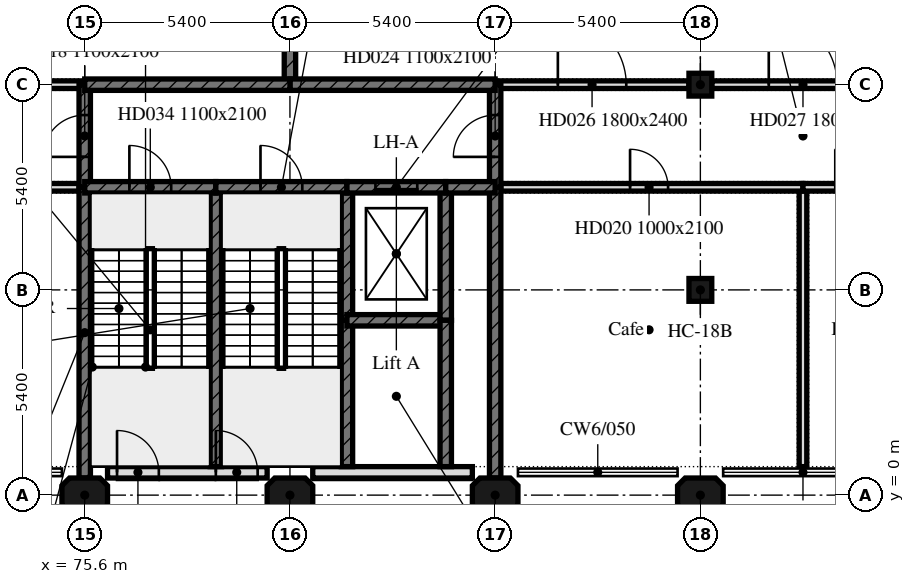
"""IFC4 building model, lengths in metres.
Left out: names, types, materials, properties, quantities, classifications, styles, units other than length and angle.
Written with IfcOpenShell. Run it as: python <this file> out.ifc"""

import sys

from ifc_helpers import new_model, si_unit, direction, frame, frame_2d, origin, origin_2d, place, context, subcontext, project, spatial, polyline, rectangle, outline, extrude, element, fill, save


model = new_model("IFC4")
c1 = context("Model", 3, precision=1e-05, world=origin(), true_north=direction((0.0, 1.0)))
c2 = subcontext(c1, "Body", "Model", "MODEL_VIEW")
j1 = project(units=[si_unit("LENGTHUNIT", "METRE"), si_unit("PLANEANGLEUNIT", "RADIAN")], contexts=[c1])
p1 = place(None, origin())
s1 = spatial("IfcSite", under=j1, at=p1, CompositionType="ELEMENT")
p2 = place(p1, origin())
s2 = spatial("IfcBuilding", under=s1, at=p2, CompositionType="ELEMENT")
p3 = place(p2, origin())
s3 = spatial("IfcBuildingStorey", under=s2, at=p3, CompositionType="ELEMENT", Elevation=0.0)
for number, where, z_axis, x_axis in (
    (1, (75.6, 0.0, -0.4), (0.0, 0.0, 1.0), (1.0, 0.0, 0.0)),
    (2, (81.0, 0.0, -0.4), (0.0, 0.0, 1.0), (1.0, 0.0, 0.0)),
    (3, (86.4, 0.0, -0.4), (0.0, 0.0, 1.0), (1.0, 0.0, 0.0)),
    (4, (91.8, 0.0, -0.4), (0.0, 0.0, 1.0), (1.0, 0.0, 0.0)),
):
    element("IfcColumn", number, at=place(p3, frame(where, z_axis=z_axis, x_axis=x_axis)), inside=s3, PredefinedType="COLUMN", context=c2, shape_type="SweptSolid", body=[
        extrude(outline(polyline([(-0.4, -0.45), (0.4, -0.45), (0.6, -0.25), (0.6, 0.25), (0.4, 0.45), (-0.4, 0.45), (-0.6, 0.25), (-0.6, -0.25), (-0.4, -0.45)])), origin(), (0.0, 0.0, 1.0), 8.5),
    ])
for number, where, z_axis, x_axis in (
    (5, (91.8, 5.4, -0.4), (0.0, 0.0, 1.0), (1.0, 0.0, 0.0)),
    (6, (91.8, 10.8, -0.4), (0.0, 0.0, 1.0), (1.0, 0.0, 0.0)),
):
    element("IfcColumn", number, at=place(p3, frame(where, z_axis=z_axis, x_axis=x_axis)), inside=s3, PredefinedType="COLUMN", context=c2, shape_type="SweptSolid", body=[
        extrude(rectangle(XDim=0.6, YDim=0.6, at=origin_2d()), origin(), (0.0, 0.0, 1.0), 8.5),
    ])
p4 = place(p3, frame((76.2, 0.6, 0.0), z_axis=(0.0, 0.0, 1.0), x_axis=(1.0, 0.0, 0.0)))
e7 = element("IfcWall", 7, at=p4, inside=s3, PredefinedType="SOLIDWALL", context=c2, shape_type="SweptSolid", body=[
    extrude(rectangle(XDim=4.2, YDim=0.3, at=frame_2d((2.1, 0.0))), origin(), (0.0, 0.0, 1.0), 8.1),
])
p5 = place(p4, frame((0.25, 0.0, 0.0)))
e8 = element("IfcOpeningElement", 8, at=p5, cuts=e7, PredefinedType="OPENING", context=c2, shape_type="SweptSolid", body=[
    extrude(rectangle(XDim=1.1, YDim=2.1, at=frame_2d((0.55, 1.05))), frame((0.0, 0.15, 0.0), z_axis=(0.0, -1.0, 0.0), x_axis=(1.0, 0.0, 0.0)), (0.0, 0.0, 1.0), 0.3),
])
p6 = place(p4, frame((2.85, 0.0, 0.0)))
e9 = element("IfcOpeningElement", 9, at=p6, cuts=e7, PredefinedType="OPENING", context=c2, shape_type="SweptSolid", body=[
    extrude(rectangle(XDim=1.1, YDim=2.1, at=frame_2d((0.55, 1.05))), frame((0.0, 0.15, 0.0), z_axis=(0.0, -1.0, 0.0), x_axis=(1.0, 0.0, 0.0)), (0.0, 0.0, 1.0), 0.3),
])
p7 = place(p3, frame((81.6, 0.6, 0.0), z_axis=(0.0, 0.0, 1.0), x_axis=(1.0, 0.0, 0.0)))
e10 = element("IfcWall", 10, at=p7, inside=s3, PredefinedType="SOLIDWALL", context=c2, shape_type="SweptSolid", body=[
    extrude(rectangle(XDim=4.2, YDim=0.3, at=frame_2d((2.1, 0.0))), origin(), (0.0, 0.0, 1.0), 8.1),
])
p8 = place(p3, frame((65.55, 8.1, 0.0), z_axis=(0.0, 0.0, 1.0), x_axis=(1.0, 0.0, 0.0)))
e11 = element("IfcWall", 11, at=p8, inside=s3, PredefinedType="PARTITIONING", context=c2, shape_type="SweptSolid", body=[
    extrude(rectangle(XDim=10.05, YDim=0.2, at=frame_2d((5.025, 0.0))), origin(), (0.0, 0.0, 1.0), 8.1),
])
p9 = place(p8, frame((4.525, 0.0, 0.0)))
e12 = element("IfcOpeningElement", 12, at=p9, cuts=e11, PredefinedType="OPENING", context=c2, shape_type="SweptSolid", body=[
    extrude(rectangle(XDim=1.0, YDim=2.1, at=frame_2d((0.5, 1.05))), frame((0.0, 0.1, 0.0), z_axis=(0.0, -1.0, 0.0), x_axis=(1.0, 0.0, 0.0)), (0.0, 0.0, 1.0), 0.2),
])
p10 = place(p3, frame((75.6, 0.45, 0.0), z_axis=(0.0, 0.0, 1.0), x_axis=(0.0, 1.0, 0.0)))
e13 = element("IfcWall", 13, at=p10, inside=s3, PredefinedType="SHEAR", context=c2, shape_type="SweptSolid", body=[
    extrude(rectangle(XDim=7.65, YDim=0.3, at=frame_2d((3.825, 0.0))), origin(), (0.0, 0.0, 1.0), 8.1),
])
p11 = place(p3, frame((70.5, 10.8, 0.0), z_axis=(0.0, 0.0, 1.0), x_axis=(1.0, 0.0, 0.0)))
e14 = element("IfcWall", 14, at=p11, inside=s3, PredefinedType="PARTITIONING", context=c2, shape_type="SweptSolid", body=[
    extrude(rectangle(XDim=5.1, YDim=0.2, at=frame_2d((2.55, 0.0))), origin(), (0.0, 0.0, 1.0), 8.1),
])
p12 = place(p3, frame((75.6, 8.1, 0.0), z_axis=(0.0, 0.0, 1.0), x_axis=(0.0, 1.0, 0.0)))
e15 = element("IfcWall", 15, at=p12, inside=s3, PredefinedType="SHEAR", context=c2, shape_type="SweptSolid", body=[
    extrude(rectangle(XDim=2.7, YDim=0.3, at=frame_2d((1.35, 0.0))), origin(), (0.0, 0.0, 1.0), 8.1),
])
p13 = place(p12, frame((0.8, 0.0, 0.0)))
e16 = element("IfcOpeningElement", 16, at=p13, cuts=e15, PredefinedType="OPENING", context=c2, shape_type="SweptSolid", body=[
    extrude(rectangle(XDim=1.1, YDim=2.1, at=frame_2d((0.55, 1.05))), frame((0.0, 0.15, 0.0), z_axis=(0.0, -1.0, 0.0), x_axis=(1.0, 0.0, 0.0)), (0.0, 0.0, 1.0), 0.3),
])
p14 = place(p3, frame((94.5, 0.75, 0.0), z_axis=(0.0, 0.0, 1.0), x_axis=(0.0, 1.0, 0.0)))
e17 = element("IfcWall", 17, at=p14, inside=s3, PredefinedType="PARTITIONING", context=c2, shape_type="SweptSolid", body=[
    extrude(rectangle(XDim=7.35, YDim=0.2, at=frame_2d((3.675, 0.0))), origin(), (0.0, 0.0, 1.0), 8.1),
])
p15 = place(p3, frame((86.4, 8.1, 0.0), z_axis=(0.0, 0.0, 1.0), x_axis=(1.0, 0.0, 0.0)))
e18 = element("IfcWall", 18, at=p15, inside=s3, PredefinedType="PARTITIONING", context=c2, shape_type="SweptSolid", body=[
    extrude(rectangle(XDim=8.1, YDim=0.2, at=frame_2d((4.05, 0.0))), origin(), (0.0, 0.0, 1.0), 8.1),
])
p16 = place(p15, frame((3.55, 0.0, 0.0)))
e19 = element("IfcOpeningElement", 19, at=p16, cuts=e18, PredefinedType="OPENING", context=c2, shape_type="SweptSolid", body=[
    extrude(rectangle(XDim=1.0, YDim=2.1, at=frame_2d((0.5, 1.05))), frame((0.0, 0.1, 0.0), z_axis=(0.0, -1.0, 0.0), x_axis=(1.0, 0.0, 0.0)), (0.0, 0.0, 1.0), 0.2),
])
p17 = place(p3, frame((86.4, 0.45, 0.0), z_axis=(0.0, 0.0, 1.0), x_axis=(0.0, 1.0, 0.0)))
e20 = element("IfcWall", 20, at=p17, inside=s3, PredefinedType="SHEAR", context=c2, shape_type="SweptSolid", body=[
    extrude(rectangle(XDim=7.65, YDim=0.3, at=frame_2d((3.825, 0.0))), origin(), (0.0, 0.0, 1.0), 8.1),
])
p18 = place(p3, frame((94.5, 8.1, 0.0), z_axis=(0.0, 0.0, 1.0), x_axis=(1.0, 0.0, 0.0)))
e21 = element("IfcWall", 21, at=p18, inside=s3, PredefinedType="PARTITIONING", context=c2, shape_type="SweptSolid", body=[
    extrude(rectangle(XDim=2.7, YDim=0.2, at=frame_2d((1.35, 0.0))), origin(), (0.0, 0.0, 1.0), 8.1),
])
p19 = place(p18, frame((0.85, 0.0, 0.0)))
e22 = element("IfcOpeningElement", 22, at=p19, cuts=e21, PredefinedType="OPENING", context=c2, shape_type="SweptSolid", body=[
    extrude(rectangle(XDim=1.0, YDim=2.1, at=frame_2d((0.5, 1.05))), frame((0.0, 0.1, 0.0), z_axis=(0.0, -1.0, 0.0), x_axis=(1.0, 0.0, 0.0)), (0.0, 0.0, 1.0), 0.2),
])
p20 = place(p3, frame((86.4, 10.8, 0.0), z_axis=(0.0, 0.0, 1.0), x_axis=(1.0, 0.0, 0.0)))
e23 = element("IfcWall", 23, at=p20, inside=s3, PredefinedType="PARTITIONING", context=c2, shape_type="SweptSolid", body=[
    extrude(rectangle(XDim=5.1, YDim=0.2, at=frame_2d((2.55, 0.0))), origin(), (0.0, 0.0, 1.0), 8.1),
])
p21 = place(p20, frame((1.65, 0.0, 0.0)))
e24 = element("IfcOpeningElement", 24, at=p21, cuts=e23, PredefinedType="OPENING", context=c2, shape_type="SweptSolid", body=[
    extrude(rectangle(XDim=1.8, YDim=2.4, at=frame_2d((0.9, 1.2))), frame((0.0, 0.1, 0.0), z_axis=(0.0, -1.0, 0.0), x_axis=(1.0, 0.0, 0.0)), (0.0, 0.0, 1.0), 0.2),
])
p22 = place(p3, frame((92.1, 10.8, 0.0), z_axis=(0.0, 0.0, 1.0), x_axis=(1.0, 0.0, 0.0)))
e25 = element("IfcWall", 25, at=p22, inside=s3, PredefinedType="PARTITIONING", context=c2, shape_type="SweptSolid", body=[
    extrude(rectangle(XDim=4.8, YDim=0.2, at=frame_2d((2.4, 0.0))), origin(), (0.0, 0.0, 1.0), 8.1),
])
p23 = place(p22, frame((1.5, 0.0, 0.0)))
e26 = element("IfcOpeningElement", 26, at=p23, cuts=e25, PredefinedType="OPENING", context=c2, shape_type="SweptSolid", body=[
    extrude(rectangle(XDim=1.8, YDim=2.4, at=frame_2d((0.9, 1.2))), frame((0.0, 0.1, 0.0), z_axis=(0.0, -1.0, 0.0), x_axis=(1.0, 0.0, 0.0)), (0.0, 0.0, 1.0), 0.2),
])
p24 = place(p3, frame((86.4, 8.1, 0.0), z_axis=(0.0, 0.0, 1.0), x_axis=(0.0, 1.0, 0.0)))
e27 = element("IfcWall", 27, at=p24, inside=s3, PredefinedType="SHEAR", context=c2, shape_type="SweptSolid", body=[
    extrude(rectangle(XDim=2.7, YDim=0.3, at=frame_2d((1.35, 0.0))), origin(), (0.0, 0.0, 1.0), 8.1),
])
p25 = place(p24, frame((0.8, 0.0, 0.0)))
e28 = element("IfcOpeningElement", 28, at=p25, cuts=e27, PredefinedType="OPENING", context=c2, shape_type="SweptSolid", body=[
    extrude(rectangle(XDim=1.1, YDim=2.1, at=frame_2d((0.55, 1.05))), frame((0.0, 0.15, 0.0), z_axis=(0.0, -1.0, 0.0), x_axis=(1.0, 0.0, 0.0)), (0.0, 0.0, 1.0), 0.3),
])
p26 = place(p3, frame((81.0, 10.8, 0.0), z_axis=(0.0, 0.0, 1.0), x_axis=(0.0, 1.0, 0.0)))
e29 = element("IfcWall", 29, at=p26, inside=s3, PredefinedType="SHEAR", context=c2, shape_type="SweptSolid", body=[
    extrude(rectangle(XDim=31.95, YDim=0.3, at=frame_2d((15.975, 0.0))), origin(), (0.0, 0.0, 1.0), 8.4),
])
for number, where, z_axis, x_axis in (
    (30, (81.0, 10.8, 0.0), (0.0, 0.0, 1.0), (1.0, 0.0, 0.0)),
    (31, (75.6, 10.8, 0.0), (0.0, 0.0, 1.0), (1.0, 0.0, 0.0)),
):
    element("IfcWall", number, at=place(p3, frame(where, z_axis=z_axis, x_axis=x_axis)), inside=s3, PredefinedType="SHEAR", context=c2, shape_type="SweptSolid", body=[
        extrude(rectangle(XDim=5.4, YDim=0.3, at=frame_2d((2.7, 0.0))), origin(), (0.0, 0.0, 1.0), 8.1),
    ])
p27 = place(p3, frame((79.05, 0.75, 0.0), z_axis=(0.0, 0.0, 1.0), x_axis=(0.0, 1.0, 0.0)))
e32 = element("IfcWall", 32, at=p27, inside=s3, PredefinedType="SHEAR", context=c2, shape_type="SweptSolid", body=[
    extrude(rectangle(XDim=7.35, YDim=0.3, at=frame_2d((3.675, 0.0))), origin(), (0.0, 0.0, 1.0), 8.1),
])
p28 = place(p3, frame((75.6, 8.1, 0.0), z_axis=(0.0, 0.0, 1.0), x_axis=(1.0, 0.0, 0.0)))
e33 = element("IfcWall", 33, at=p28, inside=s3, PredefinedType="SHEAR", context=c2, shape_type="SweptSolid", body=[
    extrude(rectangle(XDim=3.45, YDim=0.3, at=frame_2d((1.725, 0.0))), origin(), (0.0, 0.0, 1.0), 8.1),
])
p29 = place(p28, frame((1.175, 0.0, 0.0)))
e34 = element("IfcOpeningElement", 34, at=p29, cuts=e33, PredefinedType="OPENING", context=c2, shape_type="SweptSolid", body=[
    extrude(rectangle(XDim=1.1, YDim=2.1, at=frame_2d((0.55, 1.05))), frame((0.0, 0.15, 0.0), z_axis=(0.0, -1.0, 0.0), x_axis=(1.0, 0.0, 0.0)), (0.0, 0.0, 1.0), 0.3),
])
p30 = place(p3, frame((82.5, 4.6, 0.0), z_axis=(0.0, 0.0, 1.0), x_axis=(0.0, 1.0, 0.0)))
e35 = element("IfcWall", 35, at=p30, inside=s3, PredefinedType="SHEAR", context=c2, shape_type="SweptSolid", body=[
    extrude(rectangle(XDim=3.5, YDim=0.3, at=frame_2d((1.75, 0.0))), origin(), (0.0, 0.0, 1.0), 8.1),
])
p31 = place(p3, frame((82.5, 0.75, 0.0), z_axis=(0.0, 0.0, 1.0), x_axis=(0.0, 1.0, 0.0)))
e36 = element("IfcWall", 36, at=p31, inside=s3, PredefinedType="SHEAR", context=c2, shape_type="SweptSolid", body=[
    extrude(rectangle(XDim=3.85, YDim=0.3, at=frame_2d((1.925, 0.0))), origin(), (0.0, 0.0, 1.0), 8.1),
])
p32 = place(p3, frame((79.05, 8.1, 0.0), z_axis=(0.0, 0.0, 1.0), x_axis=(1.0, 0.0, 0.0)))
e37 = element("IfcWall", 37, at=p32, inside=s3, PredefinedType="SHEAR", context=c2, shape_type="SweptSolid", body=[
    extrude(rectangle(XDim=3.45, YDim=0.3, at=frame_2d((1.725, 0.0))), origin(), (0.0, 0.0, 1.0), 8.1),
])
p33 = place(p32, frame((1.175, 0.0, 0.0)))
e38 = element("IfcOpeningElement", 38, at=p33, cuts=e37, PredefinedType="OPENING", context=c2, shape_type="SweptSolid", body=[
    extrude(rectangle(XDim=1.1, YDim=2.1, at=frame_2d((0.55, 1.05))), frame((0.0, 0.15, 0.0), z_axis=(0.0, -1.0, 0.0), x_axis=(1.0, 0.0, 0.0)), (0.0, 0.0, 1.0), 0.3),
])
p34 = place(p3, frame((82.5, 4.6, 0.0), z_axis=(0.0, 0.0, 1.0), x_axis=(1.0, 0.0, 0.0)))
e39 = element("IfcWall", 39, at=p34, inside=s3, PredefinedType="SHEAR", context=c2, shape_type="SweptSolid", body=[
    extrude(rectangle(XDim=2.6, YDim=0.3, at=frame_2d((1.3, 0.0))), origin(), (0.0, 0.0, 1.0), 8.1),
])
p35 = place(p3, frame((85.1, 4.6, 0.0), z_axis=(0.0, 0.0, 1.0), x_axis=(0.0, 1.0, 0.0)))
e40 = element("IfcWall", 40, at=p35, inside=s3, PredefinedType="SHEAR", context=c2, shape_type="SweptSolid", body=[
    extrude(rectangle(XDim=3.5, YDim=0.3, at=frame_2d((1.75, 0.0))), origin(), (0.0, 0.0, 1.0), 8.1),
])
p36 = place(p3, frame((82.5, 8.1, 0.0), z_axis=(0.0, 0.0, 1.0), x_axis=(1.0, 0.0, 0.0)))
e41 = element("IfcWall", 41, at=p36, inside=s3, PredefinedType="SHEAR", context=c2, shape_type="SweptSolid", body=[
    extrude(rectangle(XDim=2.6, YDim=0.3, at=frame_2d((1.3, 0.0))), origin(), (0.0, 0.0, 1.0), 8.1),
])
p37 = place(p36, frame((0.75, 0.0, 0.0)))
e42 = element("IfcOpeningElement", 42, at=p37, cuts=e41, PredefinedType="OPENING", context=c2, shape_type="SweptSolid", body=[
    extrude(rectangle(XDim=1.1, YDim=2.1, at=frame_2d((0.55, 1.05))), frame((0.0, 0.15, 0.0), z_axis=(0.0, -1.0, 0.0), x_axis=(1.0, 0.0, 0.0)), (0.0, 0.0, 1.0), 0.3),
])
p38 = place(p3, frame((85.1, 0.75, 0.0), z_axis=(0.0, 0.0, 1.0), x_axis=(0.0, 1.0, 0.0)))
e43 = element("IfcWall", 43, at=p38, inside=s3, PredefinedType="SHEAR", context=c2, shape_type="SweptSolid", body=[
    extrude(rectangle(XDim=3.85, YDim=0.3, at=frame_2d((1.925, 0.0))), origin(), (0.0, 0.0, 1.0), 8.1),
])
p39 = place(p3, frame((85.1, 8.1, 0.0), z_axis=(0.0, 0.0, 1.0), x_axis=(1.0, 0.0, 0.0)))
e44 = element("IfcWall", 44, at=p39, inside=s3, PredefinedType="SHEAR", context=c2, shape_type="SweptSolid", body=[
    extrude(rectangle(XDim=1.3, YDim=0.3, at=frame_2d((0.65, 0.0))), origin(), (0.0, 0.0, 1.0), 8.1),
])
p40 = place(p5, origin())
e45 = element("IfcDoor", 45, at=p40, inside=s3, OperationType="SINGLE_SWING_LEFT", PredefinedType="DOOR", context=c2, shape_type="SweptSolid", body=[
    extrude(rectangle(XDim=1.1, YDim=2.1, at=frame_2d((0.55, 1.05))), frame((0.0, 0.025, 0.0), z_axis=(0.0, -1.0, 0.0), x_axis=(1.0, 0.0, 0.0)), (0.0, 0.0, 1.0), 0.05),
])
fill(e8, e45)
p41 = place(p6, origin())
e46 = element("IfcDoor", 46, at=p41, inside=s3, OperationType="SINGLE_SWING_LEFT", PredefinedType="DOOR", context=c2, shape_type="SweptSolid", body=[
    extrude(rectangle(XDim=1.1, YDim=2.1, at=frame_2d((0.55, 1.05))), frame((0.0, 0.025, 0.0), z_axis=(0.0, -1.0, 0.0), x_axis=(1.0, 0.0, 0.0)), (0.0, 0.0, 1.0), 0.05),
])
fill(e9, e46)
p42 = place(p13, origin())
e47 = element("IfcDoor", 47, at=p42, inside=s3, OperationType="SINGLE_SWING_LEFT", PredefinedType="DOOR", context=c2, shape_type="SweptSolid", body=[
    extrude(rectangle(XDim=1.1, YDim=2.1, at=frame_2d((0.55, 1.05))), frame((0.0, 0.025, 0.0), z_axis=(0.0, -1.0, 0.0), x_axis=(1.0, 0.0, 0.0)), (0.0, 0.0, 1.0), 0.05),
])
fill(e16, e47)
p43 = place(p16, origin())
e48 = element("IfcDoor", 48, at=p43, inside=s3, OperationType="SINGLE_SWING_LEFT", PredefinedType="DOOR", context=c2, shape_type="SweptSolid", body=[
    extrude(rectangle(XDim=1.0, YDim=2.1, at=frame_2d((0.5, 1.05))), frame((0.0, 0.025, 0.0), z_axis=(0.0, -1.0, 0.0), x_axis=(1.0, 0.0, 0.0)), (0.0, 0.0, 1.0), 0.05),
])
fill(e19, e48)
p44 = place(p25, origin())
e49 = element("IfcDoor", 49, at=p44, inside=s3, OperationType="SINGLE_SWING_LEFT", PredefinedType="DOOR", context=c2, shape_type="SweptSolid", body=[
    extrude(rectangle(XDim=1.1, YDim=2.1, at=frame_2d((0.55, 1.05))), frame((0.0, 0.025, 0.0), z_axis=(0.0, -1.0, 0.0), x_axis=(1.0, 0.0, 0.0)), (0.0, 0.0, 1.0), 0.05),
])
fill(e28, e49)
p45 = place(p21, origin())
e50 = element("IfcDoor", 50, at=p45, inside=s3, OperationType="DOUBLE_DOOR_SINGLE_SWING", PredefinedType="DOOR", context=c2, shape_type="SweptSolid", body=[
    extrude(rectangle(XDim=1.8, YDim=2.4, at=frame_2d((0.9, 1.2))), frame((0.0, 0.025, 0.0), z_axis=(0.0, -1.0, 0.0), x_axis=(1.0, 0.0, 0.0)), (0.0, 0.0, 1.0), 0.05),
])
fill(e24, e50)
p46 = place(p23, origin())
e51 = element("IfcDoor", 51, at=p46, inside=s3, OperationType="DOUBLE_DOOR_SINGLE_SWING", PredefinedType="DOOR", context=c2, shape_type="SweptSolid", body=[
    extrude(rectangle(XDim=1.8, YDim=2.4, at=frame_2d((0.9, 1.2))), frame((0.0, 0.025, 0.0), z_axis=(0.0, -1.0, 0.0), x_axis=(1.0, 0.0, 0.0)), (0.0, 0.0, 1.0), 0.05),
])
fill(e26, e51)
p47 = place(p29, origin())
e52 = element("IfcDoor", 52, at=p47, inside=s3, OperationType="SINGLE_SWING_LEFT", PredefinedType="DOOR", context=c2, shape_type="SweptSolid", body=[
    extrude(rectangle(XDim=1.1, YDim=2.1, at=frame_2d((0.55, 1.05))), frame((0.0, 0.025, 0.0), z_axis=(0.0, -1.0, 0.0), x_axis=(1.0, 0.0, 0.0)), (0.0, 0.0, 1.0), 0.05),
])
fill(e34, e52)
p48 = place(p33, origin())
e53 = element("IfcDoor", 53, at=p48, inside=s3, OperationType="SINGLE_SWING_LEFT", PredefinedType="DOOR", context=c2, shape_type="SweptSolid", body=[
    extrude(rectangle(XDim=1.1, YDim=2.1, at=frame_2d((0.55, 1.05))), frame((0.0, 0.025, 0.0), z_axis=(0.0, -1.0, 0.0), x_axis=(1.0, 0.0, 0.0)), (0.0, 0.0, 1.0), 0.05),
])
fill(e38, e53)
p49 = place(p37, origin())
e54 = element("IfcDoor", 54, at=p49, inside=s3, OperationType="SLIDING_TO_LEFT", PredefinedType="DOOR", context=c2, shape_type="SweptSolid", body=[
    extrude(rectangle(XDim=1.1, YDim=2.1, at=frame_2d((0.55, 1.05))), frame((0.0, 0.025, 0.0), z_axis=(0.0, -1.0, 0.0), x_axis=(1.0, 0.0, 0.0)), (0.0, 0.0, 1.0), 0.05),
])
fill(e42, e54)
save(model, sys.argv[1])
